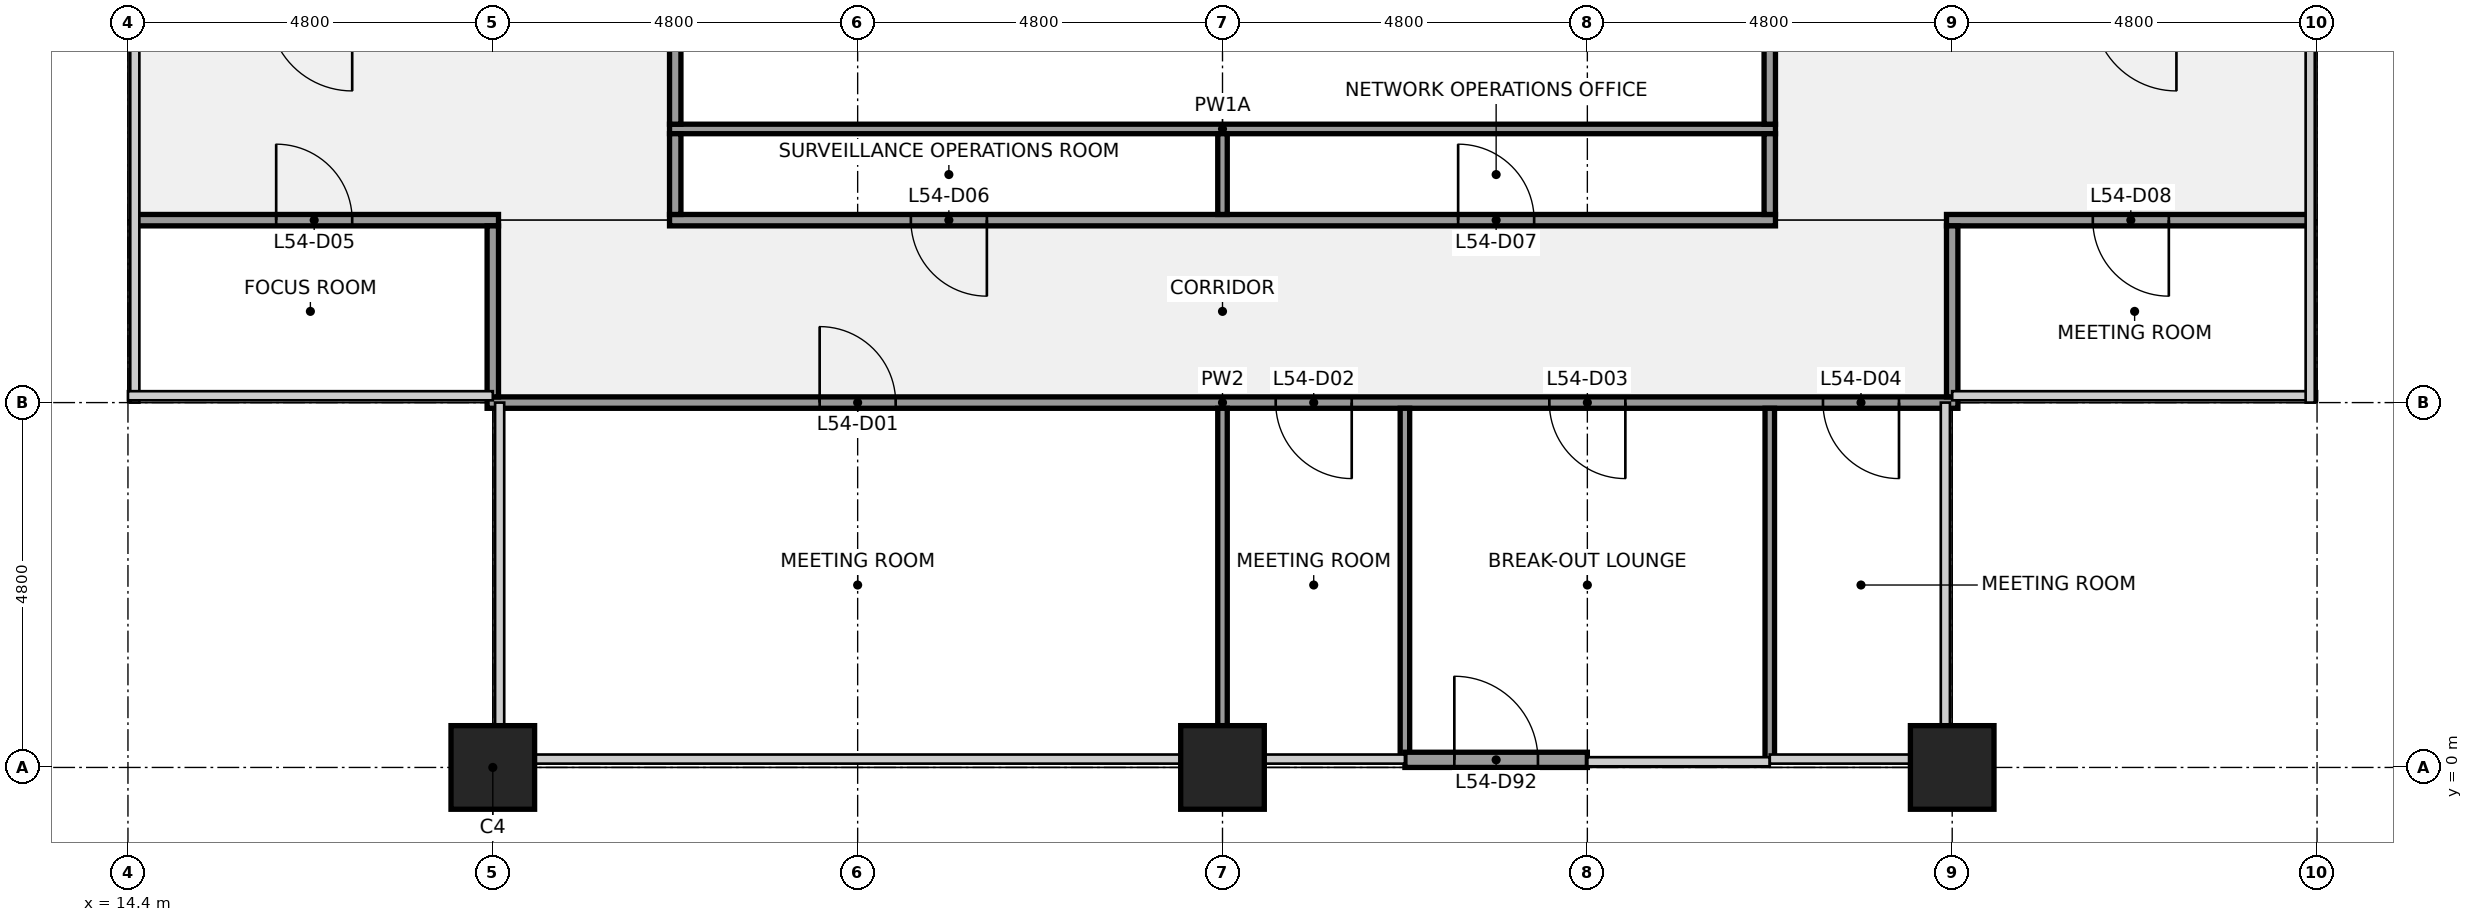
"""IFC4 building model, lengths in metres.
Left out: names, types, materials, properties, quantities, classifications, styles, units other than length and angle.
Written with IfcOpenShell. Run it as: python <this file> out.ifc"""

import sys

from ifc_helpers import new_model, si_unit, direction, frame, frame_2d, origin, origin_2d, place, context, subcontext, project, spatial, rectangle, extrude, element, fill, save


model = new_model("IFC4")
c1 = context("Model", 3, precision=1e-05, world=origin(), true_north=direction((0.0, 1.0)))
c2 = subcontext(c1, "Body", "Model", "MODEL_VIEW")
j1 = project(units=[si_unit("LENGTHUNIT", "METRE"), si_unit("PLANEANGLEUNIT", "RADIAN")], contexts=[c1])
p1 = place(None, origin())
s1 = spatial("IfcSite", under=j1, at=p1, CompositionType="ELEMENT")
p2 = place(p1, origin())
s2 = spatial("IfcBuilding", under=s1, at=p2, CompositionType="ELEMENT")
p3 = place(p2, frame((0.0, 0.0, 245.2)))
s3 = spatial("IfcBuildingStorey", under=s2, at=p3, CompositionType="ELEMENT", Elevation=245.2)
for number, where, z_axis, x_axis in (
    (1, (19.2, 0.0, 0.0), (0.0, 0.0, 1.0), (1.0, 0.0, 0.0)),
    (2, (28.8, 0.0, 0.0), (0.0, 0.0, 1.0), (1.0, 0.0, 0.0)),
    (3, (38.4, 0.0, 0.0), (0.0, 0.0, 1.0), (1.0, 0.0, 0.0)),
):
    element("IfcColumn", number, at=place(p3, frame(where, z_axis=z_axis, x_axis=x_axis)), inside=s3, PredefinedType="COLUMN", context=c2, shape_type="SweptSolid", body=[
        extrude(rectangle(XDim=1.1, YDim=1.1, at=origin_2d()), origin(), (0.0, 0.0, 1.0), 4.0),
    ])
p4 = place(p3, frame((19.125, 4.8, 0.0), z_axis=(0.0, 0.0, 1.0), x_axis=(1.0, 0.0, 0.0)))
e4 = element("IfcWall", 4, at=p4, inside=s3, PredefinedType="PARTITIONING", context=c2, shape_type="SweptSolid", body=[
    extrude(rectangle(XDim=19.35, YDim=0.15, at=frame_2d((9.675, 0.0))), origin(), (0.0, 0.0, 1.0), 2.87),
])
p5 = place(p4, frame((4.375, 0.0, 0.0)))
e5 = element("IfcOpeningElement", 5, at=p5, cuts=e4, PredefinedType="OPENING", context=c2, shape_type="SweptSolid", body=[
    extrude(rectangle(XDim=1.0, YDim=2.1, at=frame_2d((0.5, 1.05))), frame((0.0, 0.085, 0.0), z_axis=(0.0, -1.0, 0.0), x_axis=(1.0, 0.0, 0.0)), (0.0, 0.0, 1.0), 0.17),
])
p6 = place(p4, frame((10.375, 0.0, 0.0)))
e6 = element("IfcOpeningElement", 6, at=p6, cuts=e4, PredefinedType="OPENING", context=c2, shape_type="SweptSolid", body=[
    extrude(rectangle(XDim=1.0, YDim=2.1, at=frame_2d((0.5, 1.05))), frame((0.0, 0.085, 0.0), z_axis=(0.0, -1.0, 0.0), x_axis=(1.0, 0.0, 0.0)), (0.0, 0.0, 1.0), 0.17),
])
p7 = place(p4, frame((13.975, 0.0, 0.0)))
e7 = element("IfcOpeningElement", 7, at=p7, cuts=e4, PredefinedType="OPENING", context=c2, shape_type="SweptSolid", body=[
    extrude(rectangle(XDim=1.0, YDim=2.1, at=frame_2d((0.5, 1.05))), frame((0.0, 0.085, 0.0), z_axis=(0.0, -1.0, 0.0), x_axis=(1.0, 0.0, 0.0)), (0.0, 0.0, 1.0), 0.17),
])
p8 = place(p4, frame((17.575, 0.0, 0.0)))
e8 = element("IfcOpeningElement", 8, at=p8, cuts=e4, PredefinedType="OPENING", context=c2, shape_type="SweptSolid", body=[
    extrude(rectangle(XDim=1.0, YDim=2.1, at=frame_2d((0.5, 1.05))), frame((0.0, 0.085, 0.0), z_axis=(0.0, -1.0, 0.0), x_axis=(1.0, 0.0, 0.0)), (0.0, 0.0, 1.0), 0.17),
])
p9 = place(p3, frame((14.5, 7.2, 0.0), z_axis=(0.0, 0.0, 1.0), x_axis=(1.0, 0.0, 0.0)))
e9 = element("IfcWall", 9, at=p9, inside=s3, PredefinedType="PARTITIONING", context=c2, shape_type="SweptSolid", body=[
    extrude(rectangle(XDim=4.775, YDim=0.15, at=frame_2d((2.387, 0.0))), origin(), (0.0, 0.0, 1.0), 2.87),
])
p10 = place(p9, frame((1.85, 0.0, 0.0)))
e10 = element("IfcOpeningElement", 10, at=p10, cuts=e9, PredefinedType="OPENING", context=c2, shape_type="SweptSolid", body=[
    extrude(rectangle(XDim=1.0, YDim=2.1, at=frame_2d((0.5, 1.05))), frame((0.0, 0.085, 0.0), z_axis=(0.0, -1.0, 0.0), x_axis=(1.0, 0.0, 0.0)), (0.0, 0.0, 1.0), 0.17),
])
p11 = place(p3, frame((21.525, 7.2, 0.0), z_axis=(0.0, 0.0, 1.0), x_axis=(1.0, 0.0, 0.0)))
e11 = element("IfcWall", 11, at=p11, inside=s3, PredefinedType="PARTITIONING", context=c2, shape_type="SweptSolid", body=[
    extrude(rectangle(XDim=14.55, YDim=0.15, at=frame_2d((7.275, 0.0))), origin(), (0.0, 0.0, 1.0), 2.87),
])
p12 = place(p11, frame((3.175, 0.0, 0.0)))
e12 = element("IfcOpeningElement", 12, at=p12, cuts=e11, PredefinedType="OPENING", context=c2, shape_type="SweptSolid", body=[
    extrude(rectangle(XDim=1.0, YDim=2.1, at=frame_2d((0.5, 1.05))), frame((0.0, 0.085, 0.0), z_axis=(0.0, -1.0, 0.0), x_axis=(1.0, 0.0, 0.0)), (0.0, 0.0, 1.0), 0.17),
])
p13 = place(p11, frame((10.375, 0.0, 0.0)))
e13 = element("IfcOpeningElement", 13, at=p13, cuts=e11, PredefinedType="OPENING", context=c2, shape_type="SweptSolid", body=[
    extrude(rectangle(XDim=1.0, YDim=2.1, at=frame_2d((0.5, 1.05))), frame((0.0, 0.085, 0.0), z_axis=(0.0, -1.0, 0.0), x_axis=(1.0, 0.0, 0.0)), (0.0, 0.0, 1.0), 0.17),
])
p14 = place(p3, frame((38.325, 7.2, 0.0), z_axis=(0.0, 0.0, 1.0), x_axis=(1.0, 0.0, 0.0)))
e14 = element("IfcWall", 14, at=p14, inside=s3, PredefinedType="PARTITIONING", context=c2, shape_type="SweptSolid", body=[
    extrude(rectangle(XDim=4.775, YDim=0.15, at=frame_2d((2.388, 0.0))), origin(), (0.0, 0.0, 1.0), 2.87),
])
p15 = place(p14, frame((1.925, 0.0, 0.0)))
e15 = element("IfcOpeningElement", 15, at=p15, cuts=e14, PredefinedType="OPENING", context=c2, shape_type="SweptSolid", body=[
    extrude(rectangle(XDim=1.0, YDim=2.1, at=frame_2d((0.5, 1.05))), frame((0.0, 0.085, 0.0), z_axis=(0.0, -1.0, 0.0), x_axis=(1.0, 0.0, 0.0)), (0.0, 0.0, 1.0), 0.17),
])
p16 = place(p3, frame((21.525, 8.4, 0.0), z_axis=(0.0, 0.0, 1.0), x_axis=(1.0, 0.0, 0.0)))
e16 = element("IfcWall", 16, at=p16, inside=s3, PredefinedType="PARTITIONING", context=c2, shape_type="SweptSolid", body=[
    extrude(rectangle(XDim=14.55, YDim=0.125, at=frame_2d((7.275, 0.0))), origin(), (0.0, 0.0, 1.0), 2.87),
])
p17 = place(p3, frame((19.2, 4.875, 0.0), z_axis=(0.0, 0.0, 1.0), x_axis=(0.0, 1.0, 0.0)))
e17 = element("IfcWall", 17, at=p17, inside=s3, PredefinedType="PARTITIONING", context=c2, shape_type="SweptSolid", body=[
    extrude(rectangle(XDim=2.25, YDim=0.15, at=frame_2d((1.125, 0.0))), origin(), (0.0, 0.0, 1.0), 2.87),
])
p18 = place(p3, frame((21.6, 7.275, 0.0), z_axis=(0.0, 0.0, 1.0), x_axis=(0.0, 1.0, 0.0)))
e18 = element("IfcWall", 18, at=p18, inside=s3, PredefinedType="PARTITIONING", context=c2, shape_type="SweptSolid", body=[
    extrude(rectangle(XDim=1.062, YDim=0.15, at=frame_2d((0.531, 0.0))), origin(), (0.0, 0.0, 1.0), 2.87),
])
p19 = place(p3, frame((21.6, 8.462, 0.0), z_axis=(0.0, 0.0, 1.0), x_axis=(0.0, 1.0, 0.0)))
e19 = element("IfcWall", 19, at=p19, inside=s3, PredefinedType="PARTITIONING", context=c2, shape_type="SweptSolid", body=[
    extrude(rectangle(XDim=4.675, YDim=0.15, at=frame_2d((2.337, 0.0))), origin(), (0.0, 0.0, 1.0), 2.87),
])
p20 = place(p19, frame((1.837, 0.0, 0.0)))
e20 = element("IfcOpeningElement", 20, at=p20, cuts=e19, PredefinedType="OPENING", context=c2, shape_type="SweptSolid", body=[
    extrude(rectangle(XDim=1.0, YDim=2.1, at=frame_2d((0.5, 1.05))), frame((0.0, 0.085, 0.0), z_axis=(0.0, -1.0, 0.0), x_axis=(1.0, 0.0, 0.0)), (0.0, 0.0, 1.0), 0.17),
])
p21 = place(p3, frame((28.8, 0.55, 0.0), z_axis=(0.0, 0.0, 1.0), x_axis=(0.0, 1.0, 0.0)))
e21 = element("IfcWall", 21, at=p21, inside=s3, PredefinedType="PARTITIONING", context=c2, shape_type="SweptSolid", body=[
    extrude(rectangle(XDim=4.175, YDim=0.125, at=frame_2d((2.087, 0.0))), origin(), (0.0, 0.0, 1.0), 2.87),
])
p22 = place(p3, frame((28.8, 7.275, 0.0), z_axis=(0.0, 0.0, 1.0), x_axis=(0.0, 1.0, 0.0)))
e22 = element("IfcWall", 22, at=p22, inside=s3, PredefinedType="PARTITIONING", context=c2, shape_type="SweptSolid", body=[
    extrude(rectangle(XDim=1.062, YDim=0.125, at=frame_2d((0.531, 0.0))), origin(), (0.0, 0.0, 1.0), 2.87),
])
for number, where, z_axis, x_axis in (
    (23, (31.2, 0.1, 0.0), (0.0, 0.0, 1.0), (0.0, 1.0, 0.0)),
    (24, (36.0, 0.1, 0.0), (0.0, 0.0, 1.0), (0.0, 1.0, 0.0)),
):
    element("IfcWall", number, at=place(p3, frame(where, z_axis=z_axis, x_axis=x_axis)), inside=s3, PredefinedType="PARTITIONING", context=c2, shape_type="SweptSolid", body=[
        extrude(rectangle(XDim=4.625, YDim=0.125, at=frame_2d((2.312, 0.0))), origin(), (0.0, 0.0, 1.0), 2.87),
    ])
p23 = place(p3, frame((36.0, 7.275, 0.0), z_axis=(0.0, 0.0, 1.0), x_axis=(0.0, 1.0, 0.0)))
e25 = element("IfcWall", 25, at=p23, inside=s3, PredefinedType="PARTITIONING", context=c2, shape_type="SweptSolid", body=[
    extrude(rectangle(XDim=1.062, YDim=0.15, at=frame_2d((0.531, 0.0))), origin(), (0.0, 0.0, 1.0), 2.87),
])
p24 = place(p3, frame((36.0, 8.462, 0.0), z_axis=(0.0, 0.0, 1.0), x_axis=(0.0, 1.0, 0.0)))
e26 = element("IfcWall", 26, at=p24, inside=s3, PredefinedType="PARTITIONING", context=c2, shape_type="SweptSolid", body=[
    extrude(rectangle(XDim=4.675, YDim=0.15, at=frame_2d((2.337, 0.0))), origin(), (0.0, 0.0, 1.0), 2.87),
])
p25 = place(p3, frame((38.4, 4.875, 0.0), z_axis=(0.0, 0.0, 1.0), x_axis=(0.0, 1.0, 0.0)))
e27 = element("IfcWall", 27, at=p25, inside=s3, PredefinedType="PARTITIONING", context=c2, shape_type="SweptSolid", body=[
    extrude(rectangle(XDim=2.25, YDim=0.15, at=frame_2d((1.125, 0.0))), origin(), (0.0, 0.0, 1.0), 2.87),
])
p26 = place(p3, frame((31.2, 0.1, 0.0), z_axis=(0.0, 0.0, 1.0), x_axis=(1.0, 0.0, 0.0)))
e28 = element("IfcWall", 28, at=p26, inside=s3, PredefinedType="SOLIDWALL", context=c2, shape_type="SweptSolid", body=[
    extrude(rectangle(XDim=2.4, YDim=0.2, at=frame_2d((1.2, 0.0))), origin(), (0.0, 0.0, 1.0), 3.314),
])
p27 = place(p26, frame((0.65, 0.0, 0.0)))
e29 = element("IfcOpeningElement", 29, at=p27, cuts=e28, PredefinedType="OPENING", context=c2, shape_type="SweptSolid", body=[
    extrude(rectangle(XDim=1.1, YDim=2.1, at=frame_2d((0.55, 1.05))), frame((0.0, 0.11, 0.0), z_axis=(0.0, -1.0, 0.0), x_axis=(1.0, 0.0, 0.0)), (0.0, 0.0, 1.0), 0.22),
])
for number, where, z_axis, x_axis in (
    (30, (19.2, -1.025, 0.0), (0.0, 0.0, 1.0), (1.0, 0.0, 0.0)),
    (31, (38.4, -1.025, 0.0), (0.0, 0.0, 1.0), (1.0, 0.0, 0.0)),
):
    element("IfcColumn", number, at=place(p3, frame(where, z_axis=z_axis, x_axis=x_axis)), inside=s3, PredefinedType="PILASTER", context=c2, shape_type="SweptSolid", body=[
        extrude(rectangle(XDim=2.4, YDim=0.95, at=origin_2d()), origin(), (0.0, 0.0, 1.0), 4.0),
    ])
p28 = place(p5, origin())
e32 = element("IfcDoor", 32, at=p28, inside=s3, OperationType="SINGLE_SWING_LEFT", PredefinedType="DOOR", context=c2, shape_type="SweptSolid", body=[
    extrude(rectangle(XDim=1.0, YDim=2.1, at=frame_2d((0.5, 1.05))), frame((0.0, 0.025, 0.0), z_axis=(0.0, -1.0, 0.0), x_axis=(1.0, 0.0, 0.0)), (0.0, 0.0, 1.0), 0.05),
])
fill(e5, e32)
p29 = place(p6, origin())
e33 = element("IfcDoor", 33, at=p29, inside=s3, OperationType="SINGLE_SWING_RIGHT", PredefinedType="DOOR", context=c2, shape_type="SweptSolid", body=[
    extrude(rectangle(XDim=1.0, YDim=2.1, at=frame_2d((0.5, 1.05))), frame((0.0, 0.025, 0.0), z_axis=(0.0, -1.0, 0.0), x_axis=(1.0, 0.0, 0.0)), (0.0, 0.0, 1.0), 0.05),
])
fill(e6, e33)
p30 = place(p7, origin())
e34 = element("IfcDoor", 34, at=p30, inside=s3, OperationType="SINGLE_SWING_RIGHT", PredefinedType="DOOR", context=c2, shape_type="SweptSolid", body=[
    extrude(rectangle(XDim=1.0, YDim=2.1, at=frame_2d((0.5, 1.05))), frame((0.0, 0.025, 0.0), z_axis=(0.0, -1.0, 0.0), x_axis=(1.0, 0.0, 0.0)), (0.0, 0.0, 1.0), 0.05),
])
fill(e7, e34)
p31 = place(p8, origin())
e35 = element("IfcDoor", 35, at=p31, inside=s3, OperationType="SINGLE_SWING_RIGHT", PredefinedType="DOOR", context=c2, shape_type="SweptSolid", body=[
    extrude(rectangle(XDim=1.0, YDim=2.1, at=frame_2d((0.5, 1.05))), frame((0.0, 0.025, 0.0), z_axis=(0.0, -1.0, 0.0), x_axis=(1.0, 0.0, 0.0)), (0.0, 0.0, 1.0), 0.05),
])
fill(e8, e35)
p32 = place(p10, origin())
e36 = element("IfcDoor", 36, at=p32, inside=s3, OperationType="SINGLE_SWING_LEFT", PredefinedType="DOOR", context=c2, shape_type="SweptSolid", body=[
    extrude(rectangle(XDim=1.0, YDim=2.1, at=frame_2d((0.5, 1.05))), frame((0.0, 0.025, 0.0), z_axis=(0.0, -1.0, 0.0), x_axis=(1.0, 0.0, 0.0)), (0.0, 0.0, 1.0), 0.05),
])
fill(e10, e36)
p33 = place(p12, origin())
e37 = element("IfcDoor", 37, at=p33, inside=s3, OperationType="SINGLE_SWING_RIGHT", PredefinedType="DOOR", context=c2, shape_type="SweptSolid", body=[
    extrude(rectangle(XDim=1.0, YDim=2.1, at=frame_2d((0.5, 1.05))), frame((0.0, 0.025, 0.0), z_axis=(0.0, -1.0, 0.0), x_axis=(1.0, 0.0, 0.0)), (0.0, 0.0, 1.0), 0.05),
])
fill(e12, e37)
p34 = place(p13, origin())
e38 = element("IfcDoor", 38, at=p34, inside=s3, OperationType="SINGLE_SWING_LEFT", PredefinedType="DOOR", context=c2, shape_type="SweptSolid", body=[
    extrude(rectangle(XDim=1.0, YDim=2.1, at=frame_2d((0.5, 1.05))), frame((0.0, 0.025, 0.0), z_axis=(0.0, -1.0, 0.0), x_axis=(1.0, 0.0, 0.0)), (0.0, 0.0, 1.0), 0.05),
])
fill(e13, e38)
p35 = place(p15, origin())
e39 = element("IfcDoor", 39, at=p35, inside=s3, OperationType="SINGLE_SWING_RIGHT", PredefinedType="DOOR", context=c2, shape_type="SweptSolid", body=[
    extrude(rectangle(XDim=1.0, YDim=2.1, at=frame_2d((0.5, 1.05))), frame((0.0, 0.025, 0.0), z_axis=(0.0, -1.0, 0.0), x_axis=(1.0, 0.0, 0.0)), (0.0, 0.0, 1.0), 0.05),
])
fill(e15, e39)
p36 = place(p27, origin())
e40 = element("IfcDoor", 40, at=p36, inside=s3, OperationType="SINGLE_SWING_LEFT", PredefinedType="DOOR", context=c2, shape_type="SweptSolid", body=[
    extrude(rectangle(XDim=1.1, YDim=2.1, at=frame_2d((0.55, 1.05))), frame((0.0, 0.025, 0.0), z_axis=(0.0, -1.0, 0.0), x_axis=(1.0, 0.0, 0.0)), (0.0, 0.0, 1.0), 0.05),
])
fill(e29, e40)
save(model, sys.argv[1])
